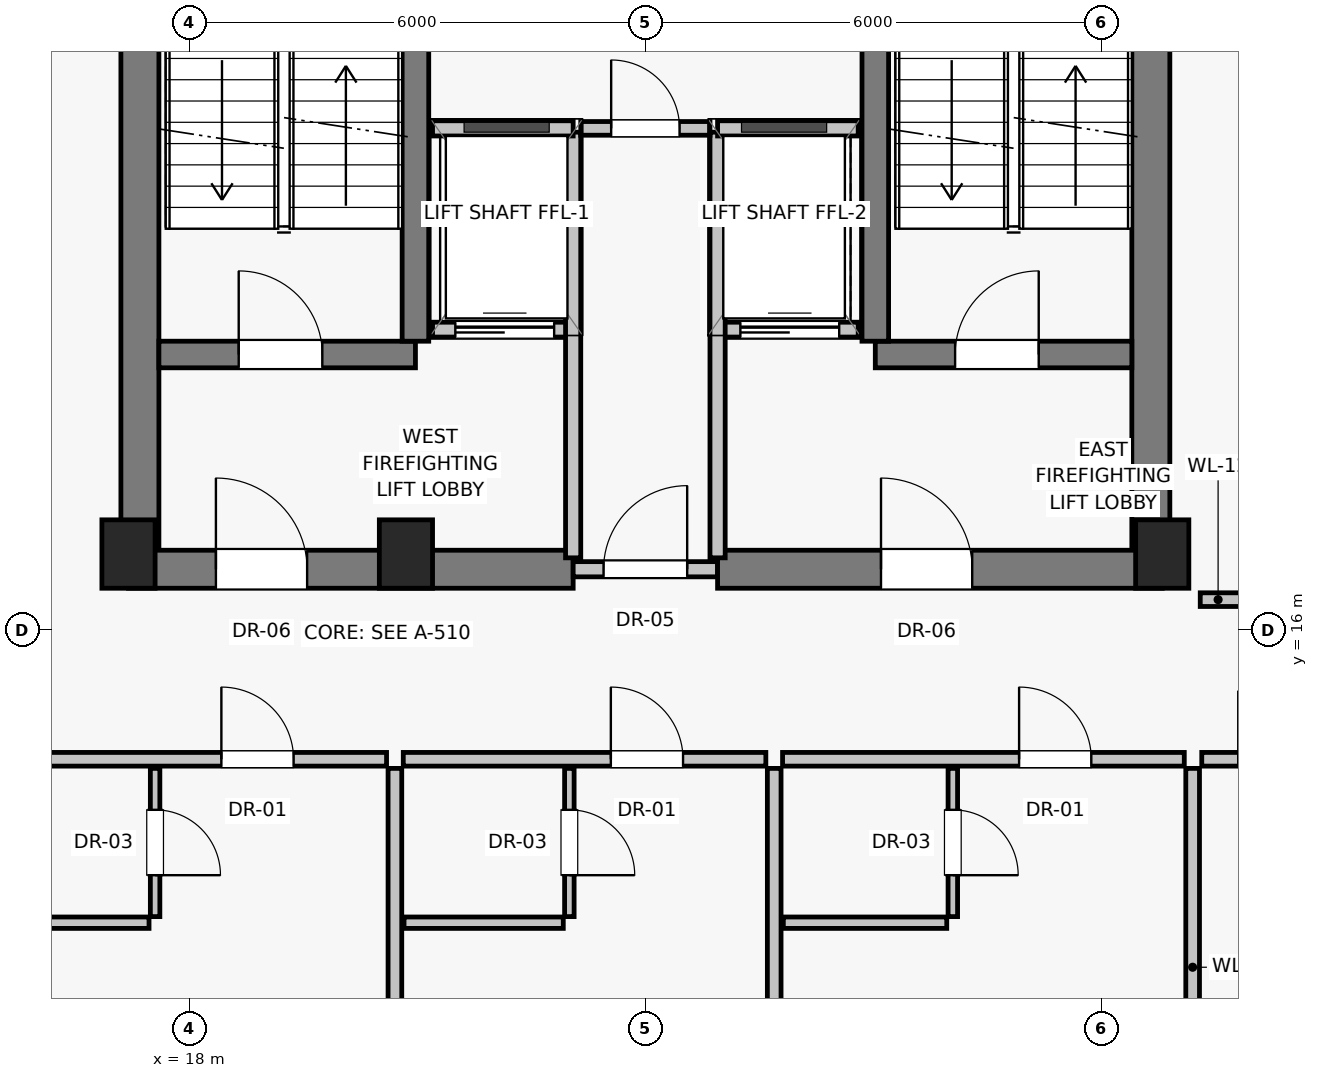
"""IFC4 building model, lengths in metres.
Left out: names, types, materials, properties, quantities, classifications, styles, units other than length and angle.
Written with IfcOpenShell. Run it as: python <this file> out.ifc"""

import sys

from ifc_helpers import new_model, si_unit, direction, frame, frame_2d, origin, origin_2d, place, context, subcontext, project, spatial, rectangle, extrude, source, transform, mapped, element, fill, save


model = new_model("IFC4")
c1 = context("Model", 3, precision=1e-05, world=origin(), true_north=direction((0.0, 1.0)))
c2 = subcontext(c1, "Body", "Model", "MODEL_VIEW")
j1 = project(units=[si_unit("LENGTHUNIT", "METRE"), si_unit("PLANEANGLEUNIT", "RADIAN")], contexts=[c1])
p1 = place(None, origin())
s1 = spatial("IfcSite", under=j1, at=p1, CompositionType="ELEMENT")
p2 = place(p1, origin())
s2 = spatial("IfcBuilding", under=s1, at=p2, CompositionType="ELEMENT")
p3 = place(p2, frame((0.0, 0.0, 254.5)))
s3 = spatial("IfcBuildingStorey", under=s2, at=p3, CompositionType="ELEMENT", Elevation=254.5)
for number, where, z_axis, x_axis in (
    (1, (17.2, 17.0, 0.0), (0.0, 0.0, 1.0), (1.0, 0.0, 0.0)),
    (2, (20.85, 17.0, 0.0), (0.0, 0.0, 1.0), (1.0, 0.0, 0.0)),
    (3, (30.8, 17.0, 0.0), (0.0, 0.0, 1.0), (1.0, 0.0, 0.0)),
):
    element("IfcColumn", number, at=place(p3, frame(where, z_axis=z_axis, x_axis=x_axis)), inside=s3, PredefinedType="PILASTER", context=c2, shape_type="SweptSolid", body=[
        extrude(rectangle(XDim=0.7, YDim=0.9, at=origin_2d()), origin(), (0.0, 0.0, 1.0), 3.25),
    ])
for number, where, z_axis, x_axis in (
    (4, (17.35, 16.8, 0.0), (0.0, 0.0, 1.0), (0.0, 1.0, 0.0)),
    (5, (30.65, 16.8, 0.0), (0.0, 0.0, 1.0), (0.0, 1.0, 0.0)),
):
    element("IfcWall", number, at=place(p3, frame(where, z_axis=z_axis, x_axis=x_axis)), inside=s3, PredefinedType="SHEAR", context=c2, shape_type="SweptSolid", body=[
        extrude(rectangle(XDim=14.2, YDim=0.5, at=frame_2d((7.1, 0.0))), origin(), (0.0, 0.0, 1.0), 3.015),
    ])
p4 = place(p3, frame((17.2, 16.8, 0.0), z_axis=(0.0, 0.0, 1.0), x_axis=(1.0, 0.0, 0.0)))
e6 = element("IfcWall", 6, at=p4, inside=s3, PredefinedType="SHEAR", context=c2, shape_type="SweptSolid", body=[
    extrude(rectangle(XDim=5.85, YDim=0.5, at=frame_2d((2.925, 0.0))), origin(), (0.0, 0.0, 1.0), 3.015),
])
p5 = place(p4, frame((1.15, 0.0, 0.0)))
e7 = element("IfcOpeningElement", 7, at=p5, cuts=e6, PredefinedType="OPENING", context=c2, shape_type="SweptSolid", body=[
    extrude(rectangle(XDim=1.2, YDim=2.03, at=frame_2d((0.6, 1.015))), frame((0.0, 0.26, 0.0), z_axis=(0.0, -1.0, 0.0), x_axis=(1.0, 0.0, 0.0)), (0.0, 0.0, 1.0), 0.52),
])
p6 = place(p3, frame((23.05, 16.8, 0.0), z_axis=(0.0, 0.0, 1.0), x_axis=(1.0, 0.0, 0.0)))
e8 = element("IfcWall", 8, at=p6, inside=s3, PredefinedType="SOLIDWALL", context=c2, shape_type="SweptSolid", body=[
    extrude(rectangle(XDim=1.9, YDim=0.2, at=frame_2d((0.95, 0.0))), origin(), (0.0, 0.0, 1.0), 2.165),
])
p7 = place(p6, frame((0.4, 0.0, 0.0)))
e9 = element("IfcOpeningElement", 9, at=p7, cuts=e8, PredefinedType="OPENING", context=c2, shape_type="SweptSolid", body=[
    extrude(rectangle(XDim=1.1, YDim=2.03, at=frame_2d((0.55, 1.015))), frame((0.0, 0.11, 0.0), z_axis=(0.0, -1.0, 0.0), x_axis=(1.0, 0.0, 0.0)), (0.0, 0.0, 1.0), 0.22),
])
p8 = place(p3, frame((24.95, 16.8, 0.0), z_axis=(0.0, 0.0, 1.0), x_axis=(1.0, 0.0, 0.0)))
e10 = element("IfcWall", 10, at=p8, inside=s3, PredefinedType="SHEAR", context=c2, shape_type="SweptSolid", body=[
    extrude(rectangle(XDim=5.85, YDim=0.5, at=frame_2d((2.925, 0.0))), origin(), (0.0, 0.0, 1.0), 3.015),
])
p9 = place(p8, frame((2.15, 0.0, 0.0)))
e11 = element("IfcOpeningElement", 11, at=p9, cuts=e10, PredefinedType="OPENING", context=c2, shape_type="SweptSolid", body=[
    extrude(rectangle(XDim=1.2, YDim=2.03, at=frame_2d((0.6, 1.015))), frame((0.0, 0.26, 0.0), z_axis=(0.0, -1.0, 0.0), x_axis=(1.0, 0.0, 0.0)), (0.0, 0.0, 1.0), 0.52),
])
p10 = place(p3, frame((17.6, 19.625, 0.0), z_axis=(0.0, 0.0, 1.0), x_axis=(1.0, 0.0, 0.0)))
e12 = element("IfcWall", 12, at=p10, inside=s3, PredefinedType="SHEAR", context=c2, shape_type="SweptSolid", body=[
    extrude(rectangle(XDim=3.375, YDim=0.35, at=frame_2d((1.688, 0.0))), origin(), (0.0, 0.0, 1.0), 3.015),
])
p11 = place(p10, frame((1.05, 0.0, 0.0)))
e13 = element("IfcOpeningElement", 13, at=p11, cuts=e12, PredefinedType="OPENING", context=c2, shape_type="SweptSolid", body=[
    extrude(rectangle(XDim=1.1, YDim=2.03, at=frame_2d((0.55, 1.015))), frame((0.0, 0.185, 0.0), z_axis=(0.0, -1.0, 0.0), x_axis=(1.0, 0.0, 0.0)), (0.0, 0.0, 1.0), 0.37),
])
p12 = place(p3, frame((21.2, 19.95, 0.0), z_axis=(0.0, 0.0, 1.0), x_axis=(1.0, 0.0, 0.0)))
e14 = element("IfcWall", 14, at=p12, inside=s3, PredefinedType="SOLIDWALL", context=c2, shape_type="SweptSolid", body=[
    extrude(rectangle(XDim=1.85, YDim=0.2, at=frame_2d((0.925, 0.0))), origin(), (0.0, 0.0, 1.0), 3.015),
])
p13 = place(p12, frame((0.3, 0.0, 0.0)))
e15 = element("IfcOpeningElement", 15, at=p13, cuts=e14, PredefinedType="OPENING", context=c2, shape_type="SweptSolid", body=[
    extrude(rectangle(XDim=1.3, YDim=2.25, at=frame_2d((0.65, 1.125))), frame((0.0, 0.11, 0.0), z_axis=(0.0, -1.0, 0.0), x_axis=(1.0, 0.0, 0.0)), (0.0, 0.0, 1.0), 0.22),
])
p14 = place(p3, frame((24.95, 19.95, 0.0), z_axis=(0.0, 0.0, 1.0), x_axis=(1.0, 0.0, 0.0)))
e16 = element("IfcWall", 16, at=p14, inside=s3, PredefinedType="SOLIDWALL", context=c2, shape_type="SweptSolid", body=[
    extrude(rectangle(XDim=1.85, YDim=0.2, at=frame_2d((0.925, 0.0))), origin(), (0.0, 0.0, 1.0), 3.015),
])
p15 = place(p14, frame((0.3, 0.0, 0.0)))
e17 = element("IfcOpeningElement", 17, at=p15, cuts=e16, PredefinedType="OPENING", context=c2, shape_type="SweptSolid", body=[
    extrude(rectangle(XDim=1.3, YDim=2.25, at=frame_2d((0.65, 1.125))), frame((0.0, 0.11, 0.0), z_axis=(0.0, -1.0, 0.0), x_axis=(1.0, 0.0, 0.0)), (0.0, 0.0, 1.0), 0.22),
])
p16 = place(p3, frame((27.025, 19.625, 0.0), z_axis=(0.0, 0.0, 1.0), x_axis=(1.0, 0.0, 0.0)))
e18 = element("IfcWall", 18, at=p16, inside=s3, PredefinedType="SHEAR", context=c2, shape_type="SweptSolid", body=[
    extrude(rectangle(XDim=3.375, YDim=0.35, at=frame_2d((1.688, 0.0))), origin(), (0.0, 0.0, 1.0), 3.015),
])
p17 = place(p16, frame((1.05, 0.0, 0.0)))
e19 = element("IfcOpeningElement", 19, at=p17, cuts=e18, PredefinedType="OPENING", context=c2, shape_type="SweptSolid", body=[
    extrude(rectangle(XDim=1.1, YDim=2.03, at=frame_2d((0.55, 1.015))), frame((0.0, 0.185, 0.0), z_axis=(0.0, -1.0, 0.0), x_axis=(1.0, 0.0, 0.0)), (0.0, 0.0, 1.0), 0.37),
])
for number, where, z_axis, x_axis in (
    (20, (20.975, 19.8, 0.0), (0.0, 0.0, 1.0), (0.0, 1.0, 0.0)),
    (21, (27.025, 19.8, 0.0), (0.0, 0.0, 1.0), (0.0, 1.0, 0.0)),
):
    element("IfcWall", number, at=place(p3, frame(where, z_axis=z_axis, x_axis=x_axis)), inside=s3, PredefinedType="SHEAR", context=c2, shape_type="SweptSolid", body=[
        extrude(rectangle(XDim=8.775, YDim=0.35, at=frame_2d((4.387, 0.0))), origin(), (0.0, 0.0, 1.0), 3.015),
    ])
for number, where, z_axis, x_axis in (
    (22, (23.05, 16.95, 0.0), (0.0, 0.0, 1.0), (0.0, 1.0, 0.0)),
    (23, (24.95, 16.95, 0.0), (0.0, 0.0, 1.0), (0.0, 1.0, 0.0)),
):
    element("IfcWall", number, at=place(p3, frame(where, z_axis=z_axis, x_axis=x_axis)), inside=s3, PredefinedType="SOLIDWALL", context=c2, shape_type="SweptSolid", body=[
        extrude(rectangle(XDim=5.6, YDim=0.2, at=frame_2d((2.8, 0.0))), origin(), (0.0, 0.0, 1.0), 3.015),
    ])
for number, where, z_axis, x_axis in (
    (24, (21.2, 22.6, 0.0), (0.0, 0.0, 1.0), (1.0, 0.0, 0.0)),
    (25, (24.95, 22.6, 0.0), (0.0, 0.0, 1.0), (1.0, 0.0, 0.0)),
):
    element("IfcWall", number, at=place(p3, frame(where, z_axis=z_axis, x_axis=x_axis)), inside=s3, PredefinedType="SOLIDWALL", context=c2, shape_type="SweptSolid", body=[
        extrude(rectangle(XDim=1.85, YDim=0.2, at=frame_2d((0.925, 0.0))), origin(), (0.0, 0.0, 1.0), 3.015),
    ])
p18 = place(p3, frame((23.15, 22.6, 0.0), z_axis=(0.0, 0.0, 1.0), x_axis=(1.0, 0.0, 0.0)))
e26 = element("IfcWall", 26, at=p18, inside=s3, PredefinedType="PARTITIONING", context=c2, shape_type="SweptSolid", body=[
    extrude(rectangle(XDim=1.7, YDim=0.18, at=frame_2d((0.85, 0.0))), origin(), (0.0, 0.0, 1.0), 3.015),
])
p19 = place(p18, frame((0.4, 0.0, 0.0)))
e27 = element("IfcOpeningElement", 27, at=p19, cuts=e26, PredefinedType="OPENING", context=c2, shape_type="SweptSolid", body=[
    extrude(rectangle(XDim=0.9, YDim=2.01, at=frame_2d((0.45, 1.005))), frame((0.0, 0.1, 0.0), z_axis=(0.0, -1.0, 0.0), x_axis=(1.0, 0.0, 0.0)), (0.0, 0.0, 1.0), 0.2),
])
p20 = place(p3, frame((31.2, 14.18, 0.0), z_axis=(0.0, 0.0, 1.0), x_axis=(0.0, -1.0, 0.0)))
e28 = element("IfcWall", 28, at=p20, inside=s3, PredefinedType="PARTITIONING", context=c2, shape_type="SweptSolid", body=[
    extrude(rectangle(XDim=5.232, YDim=0.18, at=frame_2d((2.616, 0.0))), origin(), (0.0, 0.0, 1.0), 3.015),
])
p21 = place(p3, frame((15.31, 14.3, 0.0), z_axis=(0.0, 0.0, 1.0), x_axis=(1.0, 0.0, 0.0)))
e29 = element("IfcWall", 29, at=p21, inside=s3, PredefinedType="PARTITIONING", context=c2, shape_type="SweptSolid", body=[
    extrude(rectangle(XDim=5.285, YDim=0.18, at=frame_2d((2.643, 0.0))), origin(), (0.0, 0.0, 1.0), 3.015),
])
p22 = place(p21, frame((3.112, 0.0, 0.0)))
e30 = element("IfcOpeningElement", 30, at=p22, cuts=e29, PredefinedType="OPENING", context=c2, shape_type="SweptSolid", body=[
    extrude(rectangle(XDim=0.95, YDim=2.02, at=frame_2d((0.475, 1.01))), frame((0.0, 0.1, 0.0), z_axis=(0.0, -1.0, 0.0), x_axis=(1.0, 0.0, 0.0)), (0.0, 0.0, 1.0), 0.2),
])
p23 = place(p3, frame((17.55, 14.18, 0.0), z_axis=(0.0, 0.0, 1.0), x_axis=(0.0, -1.0, 0.0)))
e31 = element("IfcWall", 31, at=p23, inside=s3, PredefinedType="PARTITIONING", context=c2, shape_type="SweptSolid", body=[
    extrude(rectangle(XDim=1.95, YDim=0.125, at=frame_2d((0.975, 0.0))), origin(), (0.0, 0.0, 1.0), 3.015),
])
p24 = place(p23, frame((0.545, 0.0, 0.0)))
e32 = element("IfcOpeningElement", 32, at=p24, cuts=e31, PredefinedType="OPENING", context=c2, shape_type="SweptSolid", body=[
    extrude(rectangle(XDim=0.86, YDim=2.01, at=frame_2d((0.43, 1.005))), frame((0.0, 0.073, 0.0), z_axis=(0.0, -1.0, 0.0), x_axis=(1.0, 0.0, 0.0)), (0.0, 0.0, 1.0), 0.145),
])
p25 = place(p3, frame((15.32, 12.15, 0.0), z_axis=(0.0, 0.0, 1.0), x_axis=(1.0, 0.0, 0.0)))
e33 = element("IfcWall", 33, at=p25, inside=s3, PredefinedType="PARTITIONING", context=c2, shape_type="SweptSolid", body=[
    extrude(rectangle(XDim=2.15, YDim=0.15, at=frame_2d((1.075, 0.0))), origin(), (0.0, 0.0, 1.0), 3.015),
])
p26 = place(p3, frame((20.705, 14.18, 0.0), z_axis=(0.0, 0.0, 1.0), x_axis=(0.0, -1.0, 0.0)))
e34 = element("IfcWall", 34, at=p26, inside=s3, PredefinedType="PARTITIONING", context=c2, shape_type="SweptSolid", body=[
    extrude(rectangle(XDim=7.899, YDim=0.18, at=frame_2d((3.95, 0.0))), origin(), (0.0, 0.0, 1.0), 2.543),
])
p27 = place(p3, frame((20.815, 14.3, 0.0), z_axis=(0.0, 0.0, 1.0), x_axis=(1.0, 0.0, 0.0)))
e35 = element("IfcWall", 35, at=p27, inside=s3, PredefinedType="PARTITIONING", context=c2, shape_type="SweptSolid", body=[
    extrude(rectangle(XDim=4.77, YDim=0.18, at=frame_2d((2.385, 0.0))), origin(), (0.0, 0.0, 1.0), 3.015),
])
p28 = place(p27, frame((2.731, 0.0, 0.0)))
e36 = element("IfcOpeningElement", 36, at=p28, cuts=e35, PredefinedType="OPENING", context=c2, shape_type="SweptSolid", body=[
    extrude(rectangle(XDim=0.95, YDim=2.02, at=frame_2d((0.475, 1.01))), frame((0.0, 0.1, 0.0), z_axis=(0.0, -1.0, 0.0), x_axis=(1.0, 0.0, 0.0)), (0.0, 0.0, 1.0), 0.2),
])
p29 = place(p3, frame((23.0, 14.18, 0.0), z_axis=(0.0, 0.0, 1.0), x_axis=(0.0, -1.0, 0.0)))
e37 = element("IfcWall", 37, at=p29, inside=s3, PredefinedType="PARTITIONING", context=c2, shape_type="SweptSolid", body=[
    extrude(rectangle(XDim=1.95, YDim=0.125, at=frame_2d((0.975, 0.0))), origin(), (0.0, 0.0, 1.0), 3.015),
])
p30 = place(p29, frame((0.545, 0.0, 0.0)))
e38 = element("IfcOpeningElement", 38, at=p30, cuts=e37, PredefinedType="OPENING", context=c2, shape_type="SweptSolid", body=[
    extrude(rectangle(XDim=0.86, YDim=2.01, at=frame_2d((0.43, 1.005))), frame((0.0, 0.073, 0.0), z_axis=(0.0, -1.0, 0.0), x_axis=(1.0, 0.0, 0.0)), (0.0, 0.0, 1.0), 0.145),
])
p31 = place(p3, frame((20.825, 12.15, 0.0), z_axis=(0.0, 0.0, 1.0), x_axis=(1.0, 0.0, 0.0)))
e39 = element("IfcWall", 39, at=p31, inside=s3, PredefinedType="PARTITIONING", context=c2, shape_type="SweptSolid", body=[
    extrude(rectangle(XDim=2.095, YDim=0.15, at=frame_2d((1.047, 0.0))), origin(), (0.0, 0.0, 1.0), 3.015),
])
p32 = place(p3, frame((25.695, 14.18, 0.0), z_axis=(0.0, 0.0, 1.0), x_axis=(0.0, -1.0, 0.0)))
e40 = element("IfcWall", 40, at=p32, inside=s3, PredefinedType="PARTITIONING", context=c2, shape_type="SweptSolid", body=[
    extrude(rectangle(XDim=6.88, YDim=0.18, at=frame_2d((3.44, 0.0))), origin(), (0.0, 0.0, 1.0), 3.015),
])
p33 = place(p3, frame((25.805, 14.3, 0.0), z_axis=(0.0, 0.0, 1.0), x_axis=(1.0, 0.0, 0.0)))
e41 = element("IfcWall", 41, at=p33, inside=s3, PredefinedType="PARTITIONING", context=c2, shape_type="SweptSolid", body=[
    extrude(rectangle(XDim=5.285, YDim=0.18, at=frame_2d((2.643, 0.0))), origin(), (0.0, 0.0, 1.0), 3.015),
])
p34 = place(p33, frame((3.112, 0.0, 0.0)))
e42 = element("IfcOpeningElement", 42, at=p34, cuts=e41, PredefinedType="OPENING", context=c2, shape_type="SweptSolid", body=[
    extrude(rectangle(XDim=0.95, YDim=2.02, at=frame_2d((0.475, 1.01))), frame((0.0, 0.1, 0.0), z_axis=(0.0, -1.0, 0.0), x_axis=(1.0, 0.0, 0.0)), (0.0, 0.0, 1.0), 0.2),
])
p35 = place(p3, frame((28.045, 14.18, 0.0), z_axis=(0.0, 0.0, 1.0), x_axis=(0.0, -1.0, 0.0)))
e43 = element("IfcWall", 43, at=p35, inside=s3, PredefinedType="PARTITIONING", context=c2, shape_type="SweptSolid", body=[
    extrude(rectangle(XDim=1.95, YDim=0.125, at=frame_2d((0.975, 0.0))), origin(), (0.0, 0.0, 1.0), 3.015),
])
p36 = place(p35, frame((0.545, 0.0, 0.0)))
e44 = element("IfcOpeningElement", 44, at=p36, cuts=e43, PredefinedType="OPENING", context=c2, shape_type="SweptSolid", body=[
    extrude(rectangle(XDim=0.86, YDim=2.01, at=frame_2d((0.43, 1.005))), frame((0.0, 0.073, 0.0), z_axis=(0.0, -1.0, 0.0), x_axis=(1.0, 0.0, 0.0)), (0.0, 0.0, 1.0), 0.145),
])
p37 = place(p3, frame((25.815, 12.15, 0.0), z_axis=(0.0, 0.0, 1.0), x_axis=(1.0, 0.0, 0.0)))
e45 = element("IfcWall", 45, at=p37, inside=s3, PredefinedType="PARTITIONING", context=c2, shape_type="SweptSolid", body=[
    extrude(rectangle(XDim=2.15, YDim=0.15, at=frame_2d((1.075, 0.0))), origin(), (0.0, 0.0, 1.0), 3.015),
])
p38 = place(p3, frame((31.3, 16.4, 0.0), z_axis=(0.0, 0.0, 1.0), x_axis=(1.0, 0.0, 0.0)))
e46 = element("IfcWall", 46, at=p38, inside=s3, PredefinedType="PARTITIONING", context=c2, shape_type="SweptSolid", body=[
    extrude(rectangle(XDim=1.92, YDim=0.18, at=frame_2d((0.96, 0.0))), origin(), (0.0, 0.0, 1.0), 3.015),
])
p39 = place(p38, frame((0.72, 0.0, 0.0)))
e47 = element("IfcOpeningElement", 47, at=p39, cuts=e46, PredefinedType="OPENING", context=c2, shape_type="SweptSolid", body=[
    extrude(rectangle(XDim=1.0, YDim=2.01, at=frame_2d((0.5, 1.005))), frame((0.0, 0.1, 0.0), z_axis=(0.0, -1.0, 0.0), x_axis=(1.0, 0.0, 0.0)), (0.0, 0.0, 1.0), 0.2),
])
p40 = place(p3, frame((31.32, 14.3, 0.0), z_axis=(0.0, 0.0, 1.0), x_axis=(1.0, 0.0, 0.0)))
e48 = element("IfcWall", 48, at=p40, inside=s3, PredefinedType="PARTITIONING", context=c2, shape_type="SweptSolid", body=[
    extrude(rectangle(XDim=1.86, YDim=0.18, at=frame_2d((0.93, 0.0))), origin(), (0.0, 0.0, 1.0), 3.015),
])
p41 = place(p40, frame((0.48, 0.0, 0.0)))
e49 = element("IfcOpeningElement", 49, at=p41, cuts=e48, PredefinedType="OPENING", context=c2, shape_type="SweptSolid", body=[
    extrude(rectangle(XDim=0.9, YDim=2.01, at=frame_2d((0.45, 1.005))), frame((0.0, 0.1, 0.0), z_axis=(0.0, -1.0, 0.0), x_axis=(1.0, 0.0, 0.0)), (0.0, 0.0, 1.0), 0.2),
])
m1 = source(origin(), c2, "Body", "SweptSolid", [
    extrude(rectangle(XDim=1.2, YDim=2.03, at=frame_2d((0.6, 1.015))), frame((0.0, 0.025, 0.0), z_axis=(0.0, -1.0, 0.0), x_axis=(1.0, 0.0, 0.0)), (0.0, 0.0, 1.0), 0.05),
])
p42 = place(p5, origin())
e50 = element("IfcDoor", 50, at=p42, inside=s3, OperationType="SINGLE_SWING_LEFT", PredefinedType="DOOR", context=c2, shape_type="MappedRepresentation", body=[
    mapped(m1, transform((0.0, 0.0, 0.0), scale=1.0)),
])
fill(e7, e50)
m2 = source(origin(), c2, "Body", "SweptSolid", [
    extrude(rectangle(XDim=1.1, YDim=2.03, at=frame_2d((0.55, 1.015))), frame((0.0, 0.025, 0.0), z_axis=(0.0, -1.0, 0.0), x_axis=(1.0, 0.0, 0.0)), (0.0, 0.0, 1.0), 0.05),
])
p43 = place(p7, origin())
e51 = element("IfcDoor", 51, at=p43, inside=s3, OperationType="SINGLE_SWING_RIGHT", PredefinedType="DOOR", context=c2, shape_type="MappedRepresentation", body=[
    mapped(m2, transform((0.0, 0.0, 0.0), scale=1.0)),
])
fill(e9, e51)
p44 = place(p9, origin())
e52 = element("IfcDoor", 52, at=p44, inside=s3, OperationType="SINGLE_SWING_LEFT", PredefinedType="DOOR", context=c2, shape_type="MappedRepresentation", body=[
    mapped(m1, transform((0.0, 0.0, 0.0), scale=1.0)),
])
fill(e11, e52)
p45 = place(p11, origin())
e53 = element("IfcDoor", 53, at=p45, inside=s3, OperationType="SINGLE_SWING_LEFT", PredefinedType="DOOR", context=c2, shape_type="MappedRepresentation", body=[
    mapped(m2, transform((0.0, 0.0, 0.0), scale=1.0)),
])
fill(e13, e53)
m3 = source(origin(), c2, "Body", "SweptSolid", [
    extrude(rectangle(XDim=1.3, YDim=2.25, at=frame_2d((0.65, 1.125))), frame((0.0, 0.025, 0.0), z_axis=(0.0, -1.0, 0.0), x_axis=(1.0, 0.0, 0.0)), (0.0, 0.0, 1.0), 0.05),
])
p46 = place(p13, origin())
e54 = element("IfcDoor", 54, at=p46, inside=s3, OperationType="SLIDING_TO_LEFT", PredefinedType="DOOR", context=c2, shape_type="MappedRepresentation", body=[
    mapped(m3, transform((0.0, 0.0, 0.0), scale=1.0)),
])
fill(e15, e54)
p47 = place(p15, origin())
e55 = element("IfcDoor", 55, at=p47, inside=s3, OperationType="SLIDING_TO_LEFT", PredefinedType="DOOR", context=c2, shape_type="MappedRepresentation", body=[
    mapped(m3, transform((0.0, 0.0, 0.0), scale=1.0)),
])
fill(e17, e55)
p48 = place(p17, origin())
e56 = element("IfcDoor", 56, at=p48, inside=s3, OperationType="SINGLE_SWING_RIGHT", PredefinedType="DOOR", context=c2, shape_type="MappedRepresentation", body=[
    mapped(m2, transform((0.0, 0.0, 0.0), scale=1.0)),
])
fill(e19, e56)
m4 = source(origin(), c2, "Body", "SweptSolid", [
    extrude(rectangle(XDim=0.9, YDim=2.01, at=frame_2d((0.45, 1.005))), frame((0.0, 0.025, 0.0), z_axis=(0.0, -1.0, 0.0), x_axis=(1.0, 0.0, 0.0)), (0.0, 0.0, 1.0), 0.05),
])
p49 = place(p19, origin())
e57 = element("IfcDoor", 57, at=p49, inside=s3, OperationType="SINGLE_SWING_LEFT", PredefinedType="DOOR", context=c2, shape_type="MappedRepresentation", body=[
    mapped(m4, transform((0.0, 0.0, 0.0), scale=1.0)),
])
fill(e27, e57)
m5 = source(origin(), c2, "Body", "SweptSolid", [
    extrude(rectangle(XDim=0.95, YDim=2.02, at=frame_2d((0.475, 1.01))), frame((0.0, 0.025, 0.0), z_axis=(0.0, -1.0, 0.0), x_axis=(1.0, 0.0, 0.0)), (0.0, 0.0, 1.0), 0.05),
])
p50 = place(p22, origin())
e58 = element("IfcDoor", 58, at=p50, inside=s3, OperationType="SINGLE_SWING_LEFT", PredefinedType="DOOR", context=c2, shape_type="MappedRepresentation", body=[
    mapped(m5, transform((0.0, 0.0, 0.0), scale=1.0)),
])
fill(e30, e58)
m6 = source(origin(), c2, "Body", "SweptSolid", [
    extrude(rectangle(XDim=0.86, YDim=2.01, at=frame_2d((0.43, 1.005))), frame((0.0, 0.025, 0.0), z_axis=(0.0, -1.0, 0.0), x_axis=(1.0, 0.0, 0.0)), (0.0, 0.0, 1.0), 0.05),
])
p51 = place(p24, origin())
e59 = element("IfcDoor", 59, at=p51, inside=s3, OperationType="SINGLE_SWING_RIGHT", PredefinedType="DOOR", context=c2, shape_type="MappedRepresentation", body=[
    mapped(m6, transform((0.0, 0.0, 0.0), scale=1.0)),
])
fill(e32, e59)
p52 = place(p28, origin())
e60 = element("IfcDoor", 60, at=p52, inside=s3, OperationType="SINGLE_SWING_LEFT", PredefinedType="DOOR", context=c2, shape_type="MappedRepresentation", body=[
    mapped(m5, transform((0.0, 0.0, 0.0), scale=1.0)),
])
fill(e36, e60)
p53 = place(p30, origin())
e61 = element("IfcDoor", 61, at=p53, inside=s3, OperationType="SINGLE_SWING_RIGHT", PredefinedType="DOOR", context=c2, shape_type="MappedRepresentation", body=[
    mapped(m6, transform((0.0, 0.0, 0.0), scale=1.0)),
])
fill(e38, e61)
p54 = place(p34, origin())
e62 = element("IfcDoor", 62, at=p54, inside=s3, OperationType="SINGLE_SWING_LEFT", PredefinedType="DOOR", context=c2, shape_type="MappedRepresentation", body=[
    mapped(m5, transform((0.0, 0.0, 0.0), scale=1.0)),
])
fill(e42, e62)
p55 = place(p36, origin())
e63 = element("IfcDoor", 63, at=p55, inside=s3, OperationType="SINGLE_SWING_RIGHT", PredefinedType="DOOR", context=c2, shape_type="MappedRepresentation", body=[
    mapped(m6, transform((0.0, 0.0, 0.0), scale=1.0)),
])
fill(e44, e63)
save(model, sys.argv[1])
